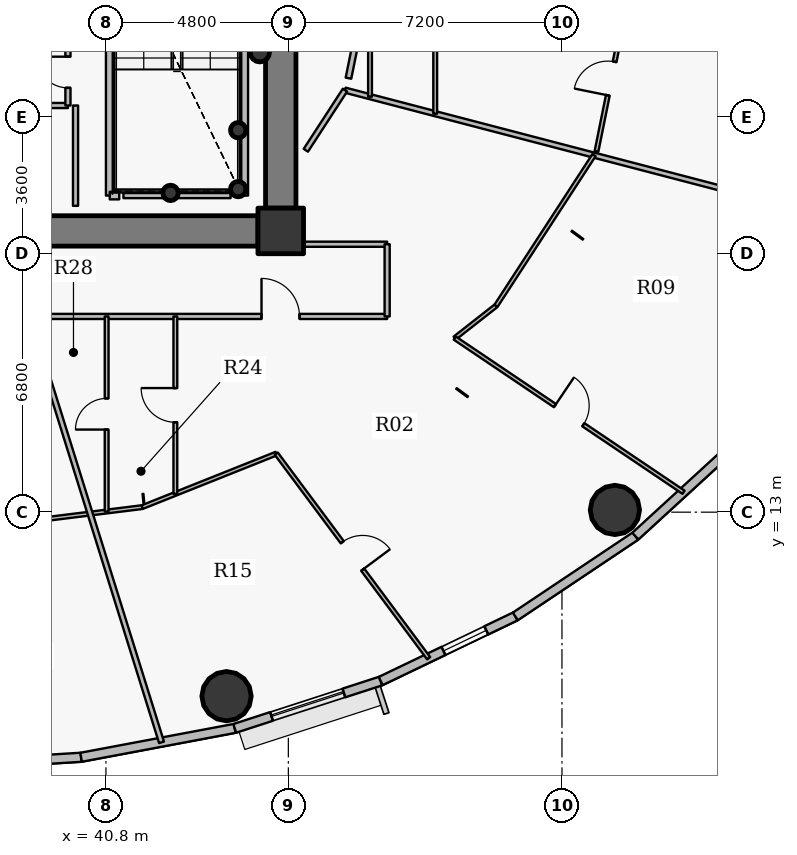
"""IFC4 building model, lengths in metres.
Left out: names, types, materials, properties, quantities, classifications, styles, units other than length and angle.
Written with IfcOpenShell. Run it as: python <this file> out.ifc"""

import sys

from ifc_helpers import new_model, si_unit, direction, frame, frame_2d, origin, origin_2d, place, context, subcontext, project, spatial, rectangle, hollow_circle, extrude, source, transform, mapped, element, fill, save


model = new_model("IFC4")
c1 = context("Model", 3, precision=1e-05, world=origin(), true_north=direction((0.0, 1.0)))
c2 = subcontext(c1, "Body", "Model", "MODEL_VIEW")
j1 = project(units=[si_unit("LENGTHUNIT", "METRE"), si_unit("PLANEANGLEUNIT", "RADIAN")], contexts=[c1])
p1 = place(None, origin())
s1 = spatial("IfcSite", under=j1, at=p1, CompositionType="ELEMENT")
p2 = place(p1, origin())
s2 = spatial("IfcBuilding", under=s1, at=p2, CompositionType="ELEMENT")
p3 = place(p2, frame((0.0, 0.0, 174.9)))
s3 = spatial("IfcBuildingStorey", under=s2, at=p3, CompositionType="ELEMENT", Elevation=174.9)
p4 = place(p3, frame((45.4, 20.4, 0.0), z_axis=(0.0, 0.0, 1.0), x_axis=(1.0, 0.0, 0.0)))
e1 = element("IfcColumn", 1, at=p4, inside=s3, PredefinedType="COLUMN", context=c2, shape_type="SweptSolid", body=[
    extrude(rectangle(XDim=1.2, YDim=1.2, at=origin_2d()), origin(), (0.0, 0.0, 1.0), 3.75),
])
for number, where, z_axis, x_axis in (
    (2, (44.28, 21.5, 0.0), (0.0, 0.0, 1.0), (1.0, 0.0, 0.0)),
    (3, (44.28, 23.05, 0.0), (0.0, 0.0, 1.0), (1.0, 0.0, 0.0)),
    (4, (42.5, 21.4, 0.0), (0.0, 0.0, 1.0), (1.0, 0.0, 0.0)),
):
    element("IfcColumn", number, at=place(p3, frame(where, z_axis=z_axis, x_axis=x_axis)), inside=s3, PredefinedType="COLUMN", context=c2, shape_type="SweptSolid", body=[
        extrude(hollow_circle(Radius=0.203, WallThickness=0.016, at=origin_2d()), origin(), (0.0, 0.0, 1.0), 3.75),
    ])
p5 = place(p3, frame((45.4, 33.0, 0.0), z_axis=(0.0, 0.0, 1.0), x_axis=(0.0, -1.0, 0.0)))
e5 = element("IfcWall", 5, at=p5, inside=s3, PredefinedType="SHEAR", context=c2, shape_type="SweptSolid", body=[
    extrude(rectangle(XDim=12.0, YDim=0.8, at=frame_2d((6.0, 0.0))), origin(), (0.0, 0.0, 1.0), 2.95),
])
p6 = place(p3, frame((44.8, 20.4, 0.0), z_axis=(0.0, 0.0, 1.0), x_axis=(-1.0, 0.0, 0.0)))
e6 = element("IfcWall", 6, at=p6, inside=s3, PredefinedType="SHEAR", context=c2, shape_type="SweptSolid", body=[
    extrude(rectangle(XDim=17.6, YDim=0.8, at=frame_2d((8.8, 0.0))), origin(), (0.0, 0.0, 1.0), 2.95),
])
p7 = place(p6, frame((9.55, 0.0, 0.0)))
e7 = element("IfcOpeningElement", 7, at=p7, cuts=e6, PredefinedType="OPENING", context=c2, shape_type="SweptSolid", body=[
    extrude(rectangle(XDim=1.15, YDim=2.15, at=origin_2d()), frame((0.575, 0.41, 1.075), z_axis=(0.0, -1.0, 0.0), x_axis=(1.0, 0.0, 0.0)), (0.0, 0.0, 1.0), 0.82),
])
for number, where, z_axis, x_axis in (
    (8, (43.973, 8.159, 0.0), (0.0, 0.0, 1.0), (1.0, 0.0, 0.0)),
    (9, (54.192, 13.058, 0.0), (0.0, 0.0, 1.0), (1.0, 0.0, 0.0)),
):
    element("IfcColumn", number, at=place(p3, frame(where, z_axis=z_axis, x_axis=x_axis)), inside=s3, PredefinedType="COLUMN", context=c2, shape_type="SweptSolid", body=[
        extrude(hollow_circle(Radius=0.65, WallThickness=0.04, at=origin_2d()), origin(), (0.0, 0.0, 1.0), 3.75),
    ])
p8 = place(p3, frame((44.85, 25.1, 0.0), z_axis=(0.0, 0.0, 1.0), x_axis=(1.0, 0.0, 0.0)))
e10 = element("IfcColumn", 10, at=p8, inside=s3, PredefinedType="COLUMN", context=c2, shape_type="SweptSolid", body=[
    extrude(hollow_circle(Radius=0.254, WallThickness=0.02, at=origin_2d()), origin(), (0.0, 0.0, 1.0), 3.75),
])
p9 = place(p3, frame((40.146, 6.551, 0.0), z_axis=(0.0, 0.0, 1.0), x_axis=(-0.998104600619, -0.061540281305, 0.0)))
e11 = element("IfcWall", 11, at=p9, inside=s3, PredefinedType="SOLIDWALL", context=c2, shape_type="SweptSolid", body=[
    extrude(rectangle(XDim=4.154, YDim=0.24, at=frame_2d((2.077, 0.0))), origin(), (0.0, 0.0, 1.0), 3.5),
])
p10 = place(p9, frame((1.077, 0.0, 0.9)))
e12 = element("IfcOpeningElement", 12, at=p10, cuts=e11, PredefinedType="OPENING", context=c2, shape_type="SweptSolid", body=[
    extrude(rectangle(XDim=2.0, YDim=1.75, at=origin_2d()), frame((1.0, 0.13, 0.875), z_axis=(0.0, -1.0, 0.0), x_axis=(1.0, 0.0, 0.0)), (0.0, 0.0, 1.0), 0.26),
])
p11 = place(p3, frame((44.189, 7.311, 0.0), z_axis=(0.0, 0.0, 1.0), x_axis=(-0.982788108205, -0.184736391573, 0.0)))
e13 = element("IfcWall", 13, at=p11, inside=s3, PredefinedType="SOLIDWALL", context=c2, shape_type="SweptSolid", body=[
    extrude(rectangle(XDim=4.114, YDim=0.24, at=frame_2d((2.057, 0.0))), origin(), (0.0, 0.0, 1.0), 3.5),
])
p12 = place(p3, frame((48.03, 8.556, 0.0), z_axis=(0.0, 0.0, 1.0), x_axis=(-0.951209870236, -0.30854462038, 0.0)))
e14 = element("IfcWall", 14, at=p12, inside=s3, PredefinedType="SOLIDWALL", context=c2, shape_type="SweptSolid", body=[
    extrude(rectangle(XDim=4.038, YDim=0.24, at=frame_2d((2.019, 0.0))), origin(), (0.0, 0.0, 1.0), 3.5),
])
p13 = place(p12, frame((1.019, 0.0, 0.9)))
e15 = element("IfcOpeningElement", 15, at=p13, cuts=e14, PredefinedType="OPENING", context=c2, shape_type="SweptSolid", body=[
    extrude(rectangle(XDim=2.0, YDim=1.75, at=origin_2d()), frame((1.0, 0.13, 0.875), z_axis=(0.0, -1.0, 0.0), x_axis=(1.0, 0.0, 0.0)), (0.0, 0.0, 1.0), 0.26),
])
p14 = place(p3, frame((51.573, 10.257, 0.0), z_axis=(0.0, 0.0, 1.0), x_axis=(-0.901564733809, -0.432644231155, 0.0)))
e16 = element("IfcWall", 16, at=p14, inside=s3, PredefinedType="SOLIDWALL", context=c2, shape_type="SweptSolid", body=[
    extrude(rectangle(XDim=3.93, YDim=0.24, at=frame_2d((1.965, 0.0))), origin(), (0.0, 0.0, 1.0), 3.5),
])
p15 = place(p14, frame((0.848, 0.0, 0.9)))
e17 = element("IfcOpeningElement", 17, at=p15, cuts=e16, PredefinedType="OPENING", context=c2, shape_type="SweptSolid", body=[
    extrude(rectangle(XDim=1.25, YDim=1.65, at=origin_2d()), frame((0.625, 0.13, 0.825), z_axis=(0.0, -1.0, 0.0), x_axis=(1.0, 0.0, 0.0)), (0.0, 0.0, 1.0), 0.26),
])
p16 = place(p3, frame((54.732, 12.369, 0.0), z_axis=(0.0, 0.0, 1.0), x_axis=(-0.831228998277, -0.555930168657, 0.0)))
e18 = element("IfcWall", 18, at=p16, inside=s3, PredefinedType="SOLIDWALL", context=c2, shape_type="SweptSolid", body=[
    extrude(rectangle(XDim=3.8, YDim=0.24, at=frame_2d((1.9, 0.0))), origin(), (0.0, 0.0, 1.0), 3.5),
])
p17 = place(p3, frame((57.428, 14.842, 0.0), z_axis=(0.0, 0.0, 1.0), x_axis=(-0.737076565834, -0.675809245349, 0.0)))
e19 = element("IfcWall", 19, at=p17, inside=s3, PredefinedType="SOLIDWALL", context=c2, shape_type="SweptSolid", body=[
    extrude(rectangle(XDim=3.658, YDim=0.24, at=frame_2d((1.829, 0.0))), origin(), (0.0, 0.0, 1.0), 3.5),
])
p18 = place(p3, frame((35.45, 23.7, 0.0), z_axis=(0.0, 0.0, 1.0), x_axis=(1.0, 0.0, 0.0)))
e20 = element("IfcWall", 20, at=p18, inside=s3, PredefinedType="PARTITIONING", context=c2, shape_type="SweptSolid", body=[
    extrude(rectangle(XDim=4.35, YDim=0.135, at=frame_2d((2.175, 0.0))), origin(), (0.0, 0.0, 1.0), 3.085),
])
p19 = place(p18, frame((1.625, 0.0, 0.0)))
e21 = element("IfcOpeningElement", 21, at=p19, cuts=e20, PredefinedType="OPENING", context=c2, shape_type="SweptSolid", body=[
    extrude(rectangle(XDim=1.1, YDim=2.15, at=origin_2d()), frame((0.55, 0.078, 1.075), z_axis=(0.0, -1.0, 0.0), x_axis=(1.0, 0.0, 0.0)), (0.0, 0.0, 1.0), 0.155),
])
p20 = place(p3, frame((36.0, 12.419, 0.0), z_axis=(0.0, 0.0, 1.0), x_axis=(0.992396615981, 0.123081097612, 0.0)))
e22 = element("IfcWall", 22, at=p20, inside=s3, PredefinedType="PARTITIONING", context=c2, shape_type="SweptSolid", body=[
    extrude(rectangle(XDim=5.798, YDim=0.1, at=frame_2d((2.899, 0.0))), origin(), (0.0, 0.0, 1.0), 2.935),
])
p21 = place(p3, frame((38.764, 18.15, 0.0), z_axis=(0.0, 0.0, 1.0), x_axis=(0.298084348379, -0.954539533624, 0.0)))
e23 = element("IfcWall", 23, at=p21, inside=s3, PredefinedType="PARTITIONING", context=c2, shape_type="SweptSolid", body=[
    extrude(rectangle(XDim=11.74, YDim=0.135, at=frame_2d((5.87, 0.0))), origin(), (0.0, 0.0, 1.0), 2.935),
])
p22 = place(p3, frame((38.764, 18.15, 0.0), z_axis=(0.0, 0.0, 1.0), x_axis=(1.0, 0.0, 0.0)))
e24 = element("IfcWall", 24, at=p22, inside=s3, PredefinedType="PARTITIONING", context=c2, shape_type="SweptSolid", body=[
    extrude(rectangle(XDim=9.436, YDim=0.135, at=frame_2d((4.718, 0.0))), origin(), (0.0, 0.0, 1.0), 2.935),
])
p23 = place(p22, frame((6.13, 0.0, 0.0)))
e25 = element("IfcOpeningElement", 25, at=p23, cuts=e24, PredefinedType="OPENING", context=c2, shape_type="SweptSolid", body=[
    extrude(rectangle(XDim=1.0, YDim=2.15, at=origin_2d()), frame((0.5, 0.078, 1.075), z_axis=(0.0, -1.0, 0.0), x_axis=(1.0, 0.0, 0.0)), (0.0, 0.0, 1.0), 0.155),
])
p24 = place(p3, frame((39.8, 23.7, 0.0), z_axis=(0.0, 0.0, 1.0), x_axis=(0.0, 1.0, 0.0)))
e26 = element("IfcWall", 26, at=p24, inside=s3, PredefinedType="PARTITIONING", context=c2, shape_type="SweptSolid", body=[
    extrude(rectangle(XDim=1.75, YDim=0.135, at=frame_2d((0.875, 0.0))), origin(), (0.0, 0.0, 1.0), 3.5),
])
p25 = place(p24, frame((0.465, 0.0, 0.0)))
e27 = element("IfcOpeningElement", 27, at=p25, cuts=e26, PredefinedType="OPENING", context=c2, shape_type="SweptSolid", body=[
    extrude(rectangle(XDim=0.82, YDim=2.1, at=origin_2d()), frame((0.41, 0.078, 1.05), z_axis=(0.0, -1.0, 0.0), x_axis=(1.0, 0.0, 0.0)), (0.0, 0.0, 1.0), 0.155),
])
p26 = place(p3, frame((40.819, 13.017, 0.0), z_axis=(0.0, 0.0, 1.0), x_axis=(0.0, 1.0, 0.0)))
e28 = element("IfcWall", 28, at=p26, inside=s3, PredefinedType="PARTITIONING", context=c2, shape_type="SweptSolid", body=[
    extrude(rectangle(XDim=5.133, YDim=0.1, at=frame_2d((2.567, 0.0))), origin(), (0.0, 0.0, 1.0), 2.935),
])
p27 = place(p26, frame((2.157, 0.0, 0.0)))
e29 = element("IfcOpeningElement", 29, at=p27, cuts=e28, PredefinedType="OPENING", context=c2, shape_type="SweptSolid", body=[
    extrude(rectangle(XDim=0.82, YDim=2.1, at=origin_2d()), frame((0.41, 0.06, 1.05), z_axis=(0.0, -1.0, 0.0), x_axis=(1.0, 0.0, 0.0)), (0.0, 0.0, 1.0), 0.12),
])
p28 = place(p3, frame((40.9, 21.33, 0.0), z_axis=(0.0, 0.0, 1.0), x_axis=(0.0, 1.0, 0.0)))
e30 = element("IfcWall", 30, at=p28, inside=s3, PredefinedType="PARTITIONING", context=c2, shape_type="SweptSolid", body=[
    extrude(rectangle(XDim=5.91, YDim=0.2, at=frame_2d((2.955, 0.0))), origin(), (0.0, 0.0, 1.0), 3.035),
])
p29 = place(p3, frame((40.9, 21.33, 0.0), z_axis=(0.0, 0.0, 1.0), x_axis=(1.0, 0.0, 0.0)))
e31 = element("IfcWall", 31, at=p29, inside=s3, PredefinedType="PARTITIONING", context=c2, shape_type="SweptSolid", body=[
    extrude(rectangle(XDim=0.25, YDim=0.2, at=frame_2d((0.125, 0.0))), origin(), (0.0, 0.0, 1.0), 3.035),
])
p30 = place(p3, frame((41.754, 13.133, 0.0), z_axis=(0.0, 0.0, 1.0), x_axis=(0.928786664236, 0.370614803182, 0.0)))
e32 = element("IfcWall", 32, at=p30, inside=s3, PredefinedType="PARTITIONING", context=c2, shape_type="SweptSolid", body=[
    extrude(rectangle(XDim=3.798, YDim=0.1, at=frame_2d((1.899, 0.0))), origin(), (0.0, 0.0, 1.0), 2.935),
])
p31 = place(p3, frame((42.627, 13.481, 0.0), z_axis=(0.0, 0.0, 1.0), x_axis=(0.0, 1.0, 0.0)))
e33 = element("IfcWall", 33, at=p31, inside=s3, PredefinedType="PARTITIONING", context=c2, shape_type="SweptSolid", body=[
    extrude(rectangle(XDim=4.669, YDim=0.1, at=frame_2d((2.334, 0.0))), origin(), (0.0, 0.0, 1.0), 3.5),
])
p32 = place(p31, frame((1.885, 0.0, 0.0)))
e34 = element("IfcOpeningElement", 34, at=p32, cuts=e33, PredefinedType="OPENING", context=c2, shape_type="SweptSolid", body=[
    extrude(rectangle(XDim=0.9, YDim=2.1, at=origin_2d()), frame((0.45, 0.06, 1.05), z_axis=(0.0, -1.0, 0.0), x_axis=(1.0, 0.0, 0.0)), (0.0, 0.0, 1.0), 0.12),
])
p33 = place(p3, frame((44.44, 21.33, 0.0), z_axis=(0.0, 0.0, 1.0), x_axis=(0.0, 1.0, 0.0)))
e35 = element("IfcWall", 35, at=p33, inside=s3, PredefinedType="PARTITIONING", context=c2, shape_type="SweptSolid", body=[
    extrude(rectangle(XDim=8.52, YDim=0.2, at=frame_2d((4.26, 0.0))), origin(), (0.0, 0.0, 1.0), 3.5),
])
p34 = place(p3, frame((45.282, 14.54, 0.0), z_axis=(0.0, 0.0, 1.0), x_axis=(0.597407497301, -0.801937829366, 0.0)))
e36 = element("IfcWall", 36, at=p34, inside=s3, PredefinedType="PARTITIONING", context=c2, shape_type="SweptSolid", body=[
    extrude(rectangle(XDim=6.713, YDim=0.1, at=frame_2d((3.356, 0.0))), origin(), (0.0, 0.0, 1.0), 2.935),
])
p35 = place(p34, frame((2.906, 0.0, 0.0)))
e37 = element("IfcOpeningElement", 37, at=p35, cuts=e36, PredefinedType="OPENING", context=c2, shape_type="SweptSolid", body=[
    extrude(rectangle(XDim=0.9, YDim=2.1, at=origin_2d()), frame((0.45, 0.06, 1.05), z_axis=(0.0, -1.0, 0.0), x_axis=(1.0, 0.0, 0.0)), (0.0, 0.0, 1.0), 0.12),
])
p36 = place(p3, frame((45.8, 20.05, 0.0), z_axis=(0.0, 0.0, 1.0), x_axis=(1.0, 0.0, 0.0)))
e38 = element("IfcWall", 38, at=p36, inside=s3, PredefinedType="PARTITIONING", context=c2, shape_type="SweptSolid", body=[
    extrude(rectangle(XDim=2.4, YDim=0.135, at=frame_2d((1.2, 0.0))), origin(), (0.0, 0.0, 1.0), 3.5),
])
p37 = place(p3, frame((47.09, 24.105, 0.0), z_axis=(0.0, 0.0, 1.0), x_axis=(0.967573213792, -0.252590728159, 0.0)))
e39 = element("IfcWall", 39, at=p37, inside=s3, PredefinedType="PARTITIONING", context=c2, shape_type="SweptSolid", body=[
    extrude(rectangle(XDim=14.481, YDim=0.135, at=frame_2d((7.24, 0.0))), origin(), (0.0, 0.0, 1.0), 2.935),
])
p38 = place(p3, frame((47.749, 23.933, 0.0), z_axis=(0.0, 0.0, 1.0), x_axis=(0.0, 1.0, 0.0)))
e40 = element("IfcWall", 40, at=p38, inside=s3, PredefinedType="PARTITIONING", context=c2, shape_type="SweptSolid", body=[
    extrude(rectangle(XDim=9.314, YDim=0.1, at=frame_2d((4.657, 0.0))), origin(), (0.0, 0.0, 1.0), 2.935),
])
p39 = place(p38, frame((3.03, 0.0, 0.0)))
e41 = element("IfcOpeningElement", 41, at=p39, cuts=e40, PredefinedType="OPENING", context=c2, shape_type="SweptSolid", body=[
    extrude(rectangle(XDim=0.76, YDim=2.1, at=origin_2d()), frame((0.38, 0.06, 1.05), z_axis=(0.0, -1.0, 0.0), x_axis=(1.0, 0.0, 0.0)), (0.0, 0.0, 1.0), 0.12),
])
p40 = place(p3, frame((48.2, 18.15, 0.0), z_axis=(0.0, 0.0, 1.0), x_axis=(0.0, 1.0, 0.0)))
e42 = element("IfcWall", 42, at=p40, inside=s3, PredefinedType="PARTITIONING", context=c2, shape_type="SweptSolid", body=[
    extrude(rectangle(XDim=1.9, YDim=0.135, at=frame_2d((0.95, 0.0))), origin(), (0.0, 0.0, 1.0), 3.5),
])
p41 = place(p3, frame((49.464, 23.485, 0.0), z_axis=(0.0, 0.0, 1.0), x_axis=(0.0, 1.0, 0.0)))
e43 = element("IfcWall", 43, at=p41, inside=s3, PredefinedType="PARTITIONING", context=c2, shape_type="SweptSolid", body=[
    extrude(rectangle(XDim=10.465, YDim=0.1, at=frame_2d((5.232, 0.0))), origin(), (0.0, 0.0, 1.0), 2.935),
])
p42 = place(p41, frame((4.783, 0.0, 0.0)))
e44 = element("IfcOpeningElement", 44, at=p42, cuts=e43, PredefinedType="OPENING", context=c2, shape_type="SweptSolid", body=[
    extrude(rectangle(XDim=0.9, YDim=2.1, at=origin_2d()), frame((0.45, 0.06, 1.05), z_axis=(0.0, -1.0, 0.0), x_axis=(1.0, 0.0, 0.0)), (0.0, 0.0, 1.0), 0.12),
])
p43 = place(p3, frame((49.979, 17.58, 0.0), z_axis=(0.0, 0.0, 1.0), x_axis=(0.787344176355, 0.6165137046, 0.0)))
e45 = element("IfcWall", 45, at=p43, inside=s3, PredefinedType="PARTITIONING", context=c2, shape_type="SweptSolid", body=[
    extrude(rectangle(XDim=1.378, YDim=0.1, at=frame_2d((0.689, 0.0))), origin(), (0.0, 0.0, 1.0), 3.5),
])
p44 = place(p3, frame((49.979, 17.58, 0.0), z_axis=(0.0, 0.0, 1.0), x_axis=(0.829313188428, -0.55878406876, 0.0)))
e46 = element("IfcWall", 46, at=p44, inside=s3, PredefinedType="PARTITIONING", context=c2, shape_type="SweptSolid", body=[
    extrude(rectangle(XDim=7.259, YDim=0.1, at=frame_2d((3.629, 0.0))), origin(), (0.0, 0.0, 1.0), 2.935),
])
p45 = place(p44, frame((3.179, 0.0, 0.0)))
e47 = element("IfcOpeningElement", 47, at=p45, cuts=e46, PredefinedType="OPENING", context=c2, shape_type="SweptSolid", body=[
    extrude(rectangle(XDim=0.9, YDim=2.1, at=origin_2d()), frame((0.45, 0.06, 1.05), z_axis=(0.0, -1.0, 0.0), x_axis=(1.0, 0.0, 0.0)), (0.0, 0.0, 1.0), 0.12),
])
p46 = place(p3, frame((51.064, 18.429, 0.0), z_axis=(0.0, 0.0, 1.0), x_axis=(0.545362062942, 0.838200584767, 0.0)))
e48 = element("IfcWall", 48, at=p46, inside=s3, PredefinedType="PARTITIONING", context=c2, shape_type="SweptSolid", body=[
    extrude(rectangle(XDim=4.729, YDim=0.1, at=frame_2d((2.365, 0.0))), origin(), (0.0, 0.0, 1.0), 2.935),
])
p47 = place(p3, frame((53.709, 22.494, 0.0), z_axis=(0.0, 0.0, 1.0), x_axis=(0.198239863178, 0.980153537282, 0.0)))
e49 = element("IfcWall", 49, at=p47, inside=s3, PredefinedType="PARTITIONING", context=c2, shape_type="SweptSolid", body=[
    extrude(rectangle(XDim=4.597, YDim=0.1, at=frame_2d((2.299, 0.0))), origin(), (0.0, 0.0, 1.0), 2.935),
])
p48 = place(p47, frame((1.504, 0.0, 0.0)))
e50 = element("IfcOpeningElement", 50, at=p48, cuts=e49, PredefinedType="OPENING", context=c2, shape_type="SweptSolid", body=[
    extrude(rectangle(XDim=0.9, YDim=2.1, at=origin_2d()), frame((0.45, 0.06, 1.05), z_axis=(0.0, -1.0, 0.0), x_axis=(1.0, 0.0, 0.0)), (0.0, 0.0, 1.0), 0.12),
])
p49 = place(p3, frame((44.08, 21.33, 0.0), z_axis=(0.0, 0.0, 1.0), x_axis=(-1.0, 0.0, 0.0)))
e51 = element("IfcWall", 51, at=p49, inside=s3, PredefinedType="PARTITIONING", context=c2, shape_type="SweptSolid", body=[
    extrude(rectangle(XDim=2.82, YDim=0.135, at=frame_2d((1.41, 0.0))), origin(), (0.0, 0.0, 1.0), 3.035),
])
p50 = place(p3, frame((40.0, 23.7, 0.0), z_axis=(0.0, 0.0, 1.0), x_axis=(0.0, -1.0, 0.0)))
e52 = element("IfcWall", 52, at=p50, inside=s3, PredefinedType="PARTITIONING", context=c2, shape_type="SweptSolid", body=[
    extrude(rectangle(XDim=2.64, YDim=0.135, at=frame_2d((1.32, 0.0))), origin(), (0.0, 0.0, 1.0), 3.035),
])
p51 = place(p3, frame((44.81, 20.0, 0.0), z_axis=(0.0, 0.0, 1.0), x_axis=(1.0, 0.0, 0.0)))
e53 = element("IfcWall", 53, at=p51, inside=s3, PredefinedType="PARTITIONING", context=c2, shape_type="SweptSolid", body=[
    extrude(rectangle(XDim=0.98, YDim=0.135, at=frame_2d((0.49, 0.0))), origin(), (0.0, 0.0, 1.0), 2.935),
])
p52 = place(p3, frame((45.8, 20.377, 0.0), z_axis=(0.0, 0.0, 1.0), x_axis=(0.0, 1.0, 0.0)))
e54 = element("IfcWall", 54, at=p52, inside=s3, PredefinedType="PARTITIONING", context=c2, shape_type="SweptSolid", body=[
    extrude(rectangle(XDim=0.613, YDim=0.135, at=frame_2d((0.306, 0.0))), origin(), (0.0, 0.0, 1.0), 3.5),
])
p53 = place(p3, frame((46.06, 22.521, 0.0), z_axis=(0.0, 0.0, 1.0), x_axis=(0.545329049498, 0.838222063521, 0.0)))
e55 = element("IfcWall", 55, at=p53, inside=s3, PredefinedType="PARTITIONING", context=c2, shape_type="SweptSolid", body=[
    extrude(rectangle(XDim=1.889, YDim=0.135, at=frame_2d((0.944, 0.0))), origin(), (0.0, 0.0, 1.0), 2.935),
])
p54 = place(p3, frame((47.182, 24.419, 0.0), z_axis=(0.0, 0.0, 1.0), x_axis=(0.198178705385, 0.980165904698, 0.0)))
e56 = element("IfcWall", 56, at=p54, inside=s3, PredefinedType="PARTITIONING", context=c2, shape_type="SweptSolid", body=[
    extrude(rectangle(XDim=1.297, YDim=0.15, at=frame_2d((0.648, 0.0))), origin(), (0.0, 0.0, 1.0), 3.5),
])
m1 = source(origin(), c2, "Body", "SweptSolid", [
    extrude(rectangle(XDim=2.0, YDim=1.75, at=origin_2d()), frame((1.0, 0.03, 0.875), z_axis=(0.0, -1.0, 0.0), x_axis=(1.0, 0.0, 0.0)), (0.0, 0.0, 1.0), 0.06),
])
p55 = place(p13, origin())
e57 = element("IfcWindow", 57, at=p55, inside=s3, PartitioningType="DOUBLE_PANEL_VERTICAL", PredefinedType="WINDOW", context=c2, shape_type="MappedRepresentation", body=[
    mapped(m1, transform((0.0, 0.0, 0.0), x_axis=(1.0, 0.0, 0.0), y_axis=(0.0, 1.0, 0.0), z_axis=(0.0, 0.0, 1.0), scale=1.0)),
])
fill(e15, e57)
m2 = source(origin(), c2, "Body", "SweptSolid", [
    extrude(rectangle(XDim=1.25, YDim=1.65, at=origin_2d()), frame((0.625, 0.03, 0.825), z_axis=(0.0, -1.0, 0.0), x_axis=(1.0, 0.0, 0.0)), (0.0, 0.0, 1.0), 0.06),
])
p56 = place(p15, origin())
e58 = element("IfcWindow", 58, at=p56, inside=s3, PartitioningType="SINGLE_PANEL", PredefinedType="WINDOW", context=c2, shape_type="MappedRepresentation", body=[
    mapped(m2, transform((0.0, 0.0, 0.0), x_axis=(1.0, 0.0, 0.0), y_axis=(0.0, 1.0, 0.0), z_axis=(0.0, 0.0, 1.0), scale=1.0)),
])
fill(e17, e58)
m3 = source(origin(), c2, "Body", "SweptSolid", [
    extrude(rectangle(XDim=1.0, YDim=2.15, at=origin_2d()), frame((0.5, 0.025, 1.075), z_axis=(0.0, -1.0, 0.0), x_axis=(1.0, 0.0, 0.0)), (0.0, 0.0, 1.0), 0.05),
])
p57 = place(p23, origin())
e59 = element("IfcDoor", 59, at=p57, inside=s3, OperationType="SINGLE_SWING_LEFT", PredefinedType="DOOR", context=c2, shape_type="MappedRepresentation", body=[
    mapped(m3, transform((0.0, 0.0, 0.0), x_axis=(1.0, 0.0, 0.0), y_axis=(0.0, 1.0, 0.0), z_axis=(0.0, 0.0, 1.0), scale=1.0)),
])
fill(e25, e59)
m4 = source(origin(), c2, "Body", "SweptSolid", [
    extrude(rectangle(XDim=0.9, YDim=2.1, at=origin_2d()), frame((0.45, 0.025, 1.05), z_axis=(0.0, -1.0, 0.0), x_axis=(1.0, 0.0, 0.0)), (0.0, 0.0, 1.0), 0.05),
])
p58 = place(p35, origin())
e60 = element("IfcDoor", 60, at=p58, inside=s3, OperationType="SINGLE_SWING_RIGHT", PredefinedType="DOOR", context=c2, shape_type="MappedRepresentation", body=[
    mapped(m4, transform((0.0, 0.0, 0.0), x_axis=(1.0, 0.0, 0.0), y_axis=(0.0, 1.0, 0.0), z_axis=(0.0, 0.0, 1.0), scale=1.0)),
])
fill(e37, e60)
p59 = place(p45, origin())
e61 = element("IfcDoor", 61, at=p59, inside=s3, OperationType="SINGLE_SWING_LEFT", PredefinedType="DOOR", context=c2, shape_type="MappedRepresentation", body=[
    mapped(m4, transform((0.0, 0.0, 0.0), x_axis=(1.0, 0.0, 0.0), y_axis=(0.0, 1.0, 0.0), z_axis=(0.0, 0.0, 1.0), scale=1.0)),
])
fill(e47, e61)
p60 = place(p32, origin())
e62 = element("IfcDoor", 62, at=p60, inside=s3, OperationType="SINGLE_SWING_RIGHT", PredefinedType="DOOR", context=c2, shape_type="MappedRepresentation", body=[
    mapped(m4, transform((0.0, 0.0, 0.0), x_axis=(1.0, 0.0, 0.0), y_axis=(0.0, 1.0, 0.0), z_axis=(0.0, 0.0, 1.0), scale=1.0)),
])
fill(e34, e62)
m5 = source(origin(), c2, "Body", "SweptSolid", [
    extrude(rectangle(XDim=0.82, YDim=2.1, at=origin_2d()), frame((0.41, 0.025, 1.05), z_axis=(0.0, -1.0, 0.0), x_axis=(1.0, 0.0, 0.0)), (0.0, 0.0, 1.0), 0.05),
])
p61 = place(p27, origin())
e63 = element("IfcDoor", 63, at=p61, inside=s3, OperationType="SINGLE_SWING_LEFT", PredefinedType="DOOR", context=c2, shape_type="MappedRepresentation", body=[
    mapped(m5, transform((0.0, 0.0, 0.0), x_axis=(1.0, 0.0, 0.0), y_axis=(0.0, 1.0, 0.0), z_axis=(0.0, 0.0, 1.0), scale=1.0)),
])
fill(e29, e63)
p62 = place(p48, origin())
e64 = element("IfcDoor", 64, at=p62, inside=s3, OperationType="SINGLE_SWING_LEFT", PredefinedType="DOOR", context=c2, shape_type="MappedRepresentation", body=[
    mapped(m4, transform((0.0, 0.0, 0.0), x_axis=(1.0, 0.0, 0.0), y_axis=(0.0, 1.0, 0.0), z_axis=(0.0, 0.0, 1.0), scale=1.0)),
])
fill(e50, e64)
p63 = place(p25, origin())
e65 = element("IfcDoor", 65, at=p63, inside=s3, OperationType="SINGLE_SWING_RIGHT", PredefinedType="DOOR", context=c2, shape_type="MappedRepresentation", body=[
    mapped(m5, transform((0.0, 0.0, 0.0), x_axis=(1.0, 0.0, 0.0), y_axis=(0.0, 1.0, 0.0), z_axis=(0.0, 0.0, 1.0), scale=1.0)),
])
fill(e27, e65)
save(model, sys.argv[1])
